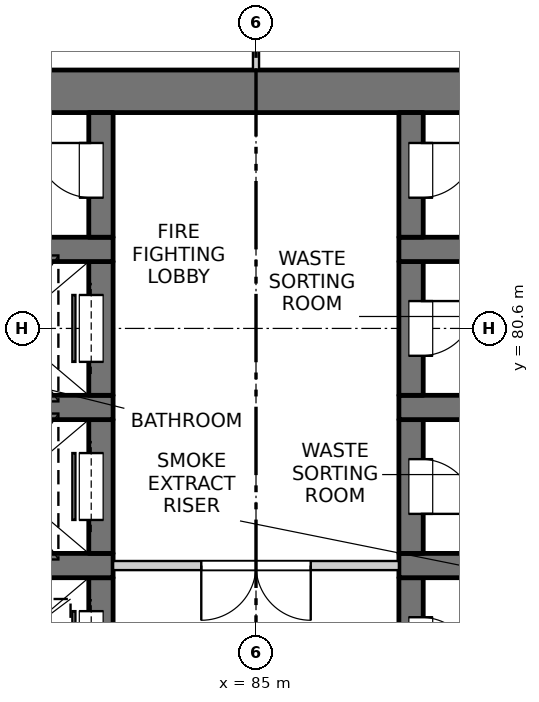
"""IFC4 building model, lengths in metres.
Left out: names, types, materials, properties, quantities, classifications, styles, units other than length and angle.
Written with IfcOpenShell. Run it as: python <this file> out.ifc"""

import sys

from ifc_helpers import new_model, si_unit, direction, frame, frame_2d, origin, place, context, subcontext, project, spatial, rectangle, extrude, element, fill, save


model = new_model("IFC4")
c1 = context("Model", 3, precision=1e-05, world=origin(), true_north=direction((0.0, 1.0)))
c2 = subcontext(c1, "Body", "Model", "MODEL_VIEW")
j1 = project(units=[si_unit("LENGTHUNIT", "METRE"), si_unit("PLANEANGLEUNIT", "RADIAN")], contexts=[c1])
p1 = place(None, origin())
s1 = spatial("IfcSite", under=j1, at=p1, CompositionType="ELEMENT")
p2 = place(p1, origin())
s2 = spatial("IfcBuilding", under=s1, at=p2, CompositionType="ELEMENT")
p3 = place(p2, frame((0.0, 0.0, 29.7)))
s3 = spatial("IfcBuildingStorey", under=s2, at=p3, CompositionType="ELEMENT", Elevation=29.7)
p4 = place(p3, frame((75.6, 84.5, -0.25), z_axis=(0.0, 0.0, 1.0), x_axis=(1.0, 0.0, 0.0)))
e1 = element("IfcWall", 1, at=p4, inside=s3, PredefinedType="SOLIDWALL", context=c2, shape_type="SweptSolid", body=[
    extrude(rectangle(XDim=18.8, YDim=0.7, at=frame_2d((9.4, 0.0))), origin(), (0.0, 0.0, 1.0), 3.4),
])
p5 = place(p3, frame((82.45, 74.3, -0.25), z_axis=(0.0, 0.0, 1.0), x_axis=(0.0, 1.0, 0.0)))
e2 = element("IfcWall", 2, at=p5, inside=s3, PredefinedType="SOLIDWALL", context=c2, shape_type="SweptSolid", body=[
    extrude(rectangle(XDim=2.2, YDim=0.4, at=frame_2d((1.1, 0.0))), origin(), (0.0, 0.0, 1.0), 3.4),
])
p6 = place(p5, frame((0.55, 0.0, 0.25)))
e3 = element("IfcOpeningElement", 3, at=p6, cuts=e2, PredefinedType="OPENING", context=c2, shape_type="SweptSolid", body=[
    extrude(rectangle(XDim=1.1, YDim=2.1, at=frame_2d((0.55, 1.05))), frame((0.0, 0.21, 0.0), z_axis=(0.0, -1.0, 0.0), x_axis=(1.0, 0.0, 0.0)), (0.0, 0.0, 1.0), 0.42),
])
p7 = place(p3, frame((79.65, 76.7, -0.25), z_axis=(0.0, 0.0, 1.0), x_axis=(1.0, 0.0, 0.0)))
e4 = element("IfcWall", 4, at=p7, inside=s3, PredefinedType="SOLIDWALL", context=c2, shape_type="SweptSolid", body=[
    extrude(rectangle(XDim=3.0, YDim=0.4, at=frame_2d((1.5, 0.0))), origin(), (0.0, 0.0, 1.0), 3.4),
])
p8 = place(p3, frame((82.45, 76.9, -0.25), z_axis=(0.0, 0.0, 1.0), x_axis=(0.0, 1.0, 0.0)))
e5 = element("IfcWall", 5, at=p8, inside=s3, PredefinedType="SOLIDWALL", context=c2, shape_type="SweptSolid", body=[
    extrude(rectangle(XDim=2.2, YDim=0.4, at=frame_2d((1.1, 0.0))), origin(), (0.0, 0.0, 1.0), 3.4),
])
p9 = place(p8, frame((0.55, 0.0, 0.25)))
e6 = element("IfcOpeningElement", 6, at=p9, cuts=e5, PredefinedType="OPENING", context=c2, shape_type="SweptSolid", body=[
    extrude(rectangle(XDim=1.1, YDim=2.1, at=frame_2d((0.55, 1.05))), frame((0.0, 0.21, 0.0), z_axis=(0.0, -1.0, 0.0), x_axis=(1.0, 0.0, 0.0)), (0.0, 0.0, 1.0), 0.42),
])
p10 = place(p3, frame((79.65, 79.3, -0.25), z_axis=(0.0, 0.0, 1.0), x_axis=(1.0, 0.0, 0.0)))
e7 = element("IfcWall", 7, at=p10, inside=s3, PredefinedType="SOLIDWALL", context=c2, shape_type="SweptSolid", body=[
    extrude(rectangle(XDim=3.0, YDim=0.4, at=frame_2d((1.5, 0.0))), origin(), (0.0, 0.0, 1.0), 3.4),
])
p11 = place(p3, frame((82.45, 79.5, -0.25), z_axis=(0.0, 0.0, 1.0), x_axis=(0.0, 1.0, 0.0)))
e8 = element("IfcWall", 8, at=p11, inside=s3, PredefinedType="SOLIDWALL", context=c2, shape_type="SweptSolid", body=[
    extrude(rectangle(XDim=2.2, YDim=0.4, at=frame_2d((1.1, 0.0))), origin(), (0.0, 0.0, 1.0), 3.4),
])
p12 = place(p11, frame((0.55, 0.0, 0.25)))
e9 = element("IfcOpeningElement", 9, at=p12, cuts=e8, PredefinedType="OPENING", context=c2, shape_type="SweptSolid", body=[
    extrude(rectangle(XDim=1.1, YDim=2.1, at=frame_2d((0.55, 1.05))), frame((0.0, 0.21, 0.0), z_axis=(0.0, -1.0, 0.0), x_axis=(1.0, 0.0, 0.0)), (0.0, 0.0, 1.0), 0.42),
])
p13 = place(p3, frame((79.65, 81.9, -0.25), z_axis=(0.0, 0.0, 1.0), x_axis=(1.0, 0.0, 0.0)))
e10 = element("IfcWall", 10, at=p13, inside=s3, PredefinedType="SOLIDWALL", context=c2, shape_type="SweptSolid", body=[
    extrude(rectangle(XDim=3.0, YDim=0.4, at=frame_2d((1.5, 0.0))), origin(), (0.0, 0.0, 1.0), 3.4),
])
p14 = place(p3, frame((82.45, 82.1, -0.25), z_axis=(0.0, 0.0, 1.0), x_axis=(0.0, 1.0, 0.0)))
e11 = element("IfcWall", 11, at=p14, inside=s3, PredefinedType="SOLIDWALL", context=c2, shape_type="SweptSolid", body=[
    extrude(rectangle(XDim=2.05, YDim=0.4, at=frame_2d((1.025, 0.0))), origin(), (0.0, 0.0, 1.0), 3.4),
])
p15 = place(p14, frame((0.65, 0.0, 0.25)))
e12 = element("IfcOpeningElement", 12, at=p15, cuts=e11, PredefinedType="OPENING", context=c2, shape_type="SweptSolid", body=[
    extrude(rectangle(XDim=0.9, YDim=2.1, at=frame_2d((0.45, 1.05))), frame((0.0, 0.21, 0.0), z_axis=(0.0, -1.0, 0.0), x_axis=(1.0, 0.0, 0.0)), (0.0, 0.0, 1.0), 0.42),
])
p16 = place(p3, frame((87.55, 74.3, -0.25), z_axis=(0.0, 0.0, 1.0), x_axis=(0.0, 1.0, 0.0)))
e13 = element("IfcWall", 13, at=p16, inside=s3, PredefinedType="SOLIDWALL", context=c2, shape_type="SweptSolid", body=[
    extrude(rectangle(XDim=2.2, YDim=0.4, at=frame_2d((1.1, 0.0))), origin(), (0.0, 0.0, 1.0), 3.4),
])
p17 = place(p16, frame((0.65, 0.0, 0.25)))
e14 = element("IfcOpeningElement", 14, at=p17, cuts=e13, PredefinedType="OPENING", context=c2, shape_type="SweptSolid", body=[
    extrude(rectangle(XDim=0.9, YDim=2.1, at=frame_2d((0.45, 1.05))), frame((0.0, 0.21, 0.0), z_axis=(0.0, -1.0, 0.0), x_axis=(1.0, 0.0, 0.0)), (0.0, 0.0, 1.0), 0.42),
])
p18 = place(p3, frame((87.35, 76.7, -0.25), z_axis=(0.0, 0.0, 1.0), x_axis=(1.0, 0.0, 0.0)))
e15 = element("IfcWall", 15, at=p18, inside=s3, PredefinedType="SOLIDWALL", context=c2, shape_type="SweptSolid", body=[
    extrude(rectangle(XDim=3.0, YDim=0.4, at=frame_2d((1.5, 0.0))), origin(), (0.0, 0.0, 1.0), 3.4),
])
p19 = place(p3, frame((87.55, 76.9, -0.25), z_axis=(0.0, 0.0, 1.0), x_axis=(0.0, 1.0, 0.0)))
e16 = element("IfcWall", 16, at=p19, inside=s3, PredefinedType="SOLIDWALL", context=c2, shape_type="SweptSolid", body=[
    extrude(rectangle(XDim=2.2, YDim=0.4, at=frame_2d((1.1, 0.0))), origin(), (0.0, 0.0, 1.0), 3.4),
])
p20 = place(p19, frame((0.65, 0.0, 0.25)))
e17 = element("IfcOpeningElement", 17, at=p20, cuts=e16, PredefinedType="OPENING", context=c2, shape_type="SweptSolid", body=[
    extrude(rectangle(XDim=0.9, YDim=2.1, at=frame_2d((0.45, 1.05))), frame((0.0, 0.21, 0.0), z_axis=(0.0, -1.0, 0.0), x_axis=(1.0, 0.0, 0.0)), (0.0, 0.0, 1.0), 0.42),
])
p21 = place(p3, frame((87.35, 79.3, -0.25), z_axis=(0.0, 0.0, 1.0), x_axis=(1.0, 0.0, 0.0)))
e18 = element("IfcWall", 18, at=p21, inside=s3, PredefinedType="SOLIDWALL", context=c2, shape_type="SweptSolid", body=[
    extrude(rectangle(XDim=3.0, YDim=0.4, at=frame_2d((1.5, 0.0))), origin(), (0.0, 0.0, 1.0), 3.4),
])
p22 = place(p3, frame((87.55, 79.5, -0.25), z_axis=(0.0, 0.0, 1.0), x_axis=(0.0, 1.0, 0.0)))
e19 = element("IfcWall", 19, at=p22, inside=s3, PredefinedType="SOLIDWALL", context=c2, shape_type="SweptSolid", body=[
    extrude(rectangle(XDim=2.2, YDim=0.4, at=frame_2d((1.1, 0.0))), origin(), (0.0, 0.0, 1.0), 3.4),
])
p23 = place(p22, frame((0.65, 0.0, 0.25)))
e20 = element("IfcOpeningElement", 20, at=p23, cuts=e19, PredefinedType="OPENING", context=c2, shape_type="SweptSolid", body=[
    extrude(rectangle(XDim=0.9, YDim=2.1, at=frame_2d((0.45, 1.05))), frame((0.0, 0.21, 0.0), z_axis=(0.0, -1.0, 0.0), x_axis=(1.0, 0.0, 0.0)), (0.0, 0.0, 1.0), 0.42),
])
p24 = place(p3, frame((87.35, 81.9, -0.25), z_axis=(0.0, 0.0, 1.0), x_axis=(1.0, 0.0, 0.0)))
e21 = element("IfcWall", 21, at=p24, inside=s3, PredefinedType="SOLIDWALL", context=c2, shape_type="SweptSolid", body=[
    extrude(rectangle(XDim=3.0, YDim=0.4, at=frame_2d((1.5, 0.0))), origin(), (0.0, 0.0, 1.0), 3.4),
])
p25 = place(p3, frame((87.55, 82.1, -0.25), z_axis=(0.0, 0.0, 1.0), x_axis=(0.0, 1.0, 0.0)))
e22 = element("IfcWall", 22, at=p25, inside=s3, PredefinedType="SOLIDWALL", context=c2, shape_type="SweptSolid", body=[
    extrude(rectangle(XDim=2.05, YDim=0.4, at=frame_2d((1.025, 0.0))), origin(), (0.0, 0.0, 1.0), 3.4),
])
p26 = place(p25, frame((0.65, 0.0, 0.25)))
e23 = element("IfcOpeningElement", 23, at=p26, cuts=e22, PredefinedType="OPENING", context=c2, shape_type="SweptSolid", body=[
    extrude(rectangle(XDim=0.9, YDim=2.1, at=frame_2d((0.45, 1.05))), frame((0.0, 0.21, 0.0), z_axis=(0.0, -1.0, 0.0), x_axis=(1.0, 0.0, 0.0)), (0.0, 0.0, 1.0), 0.42),
])
p27 = place(p3, frame((82.65, 76.7, 0.0), z_axis=(0.0, 0.0, 1.0), x_axis=(1.0, 0.0, 0.0)))
e24 = element("IfcWall", 24, at=p27, inside=s3, PredefinedType="PARTITIONING", context=c2, shape_type="SweptSolid", body=[
    extrude(rectangle(XDim=4.7, YDim=0.15, at=frame_2d((2.35, 0.0))), origin(), (0.0, 0.0, 1.0), 3.15),
])
p28 = place(p27, frame((1.45, 0.0, 0.0)))
e25 = element("IfcOpeningElement", 25, at=p28, cuts=e24, PredefinedType="OPENING", context=c2, shape_type="SweptSolid", body=[
    extrude(rectangle(XDim=1.8, YDim=2.1, at=frame_2d((0.9, 1.05))), frame((0.0, 0.085, 0.0), z_axis=(0.0, -1.0, 0.0), x_axis=(1.0, 0.0, 0.0)), (0.0, 0.0, 1.0), 0.17),
])
p29 = place(p3, frame((85.0, 84.85, 0.0), z_axis=(0.0, 0.0, 1.0), x_axis=(0.0, 1.0, 0.0)))
e26 = element("IfcWall", 26, at=p29, inside=s3, PredefinedType="PARTITIONING", context=c2, shape_type="SweptSolid", body=[
    extrude(rectangle(XDim=3.25, YDim=0.1, at=frame_2d((1.625, 0.0))), origin(), (0.0, 0.0, 1.0), 3.15),
])
p30 = place(p29, frame((1.15, 0.0, 0.0)))
e27 = element("IfcOpeningElement", 27, at=p30, cuts=e26, PredefinedType="OPENING", context=c2, shape_type="SweptSolid", body=[
    extrude(rectangle(XDim=0.9, YDim=2.1, at=frame_2d((0.45, 1.05))), frame((0.0, 0.06, 0.0), z_axis=(0.0, -1.0, 0.0), x_axis=(1.0, 0.0, 0.0)), (0.0, 0.0, 1.0), 0.12),
])
p31 = place(p6, origin())
e28 = element("IfcDoor", 28, at=p31, inside=s3, OperationType="SLIDING_TO_LEFT", PredefinedType="DOOR", context=c2, shape_type="SweptSolid", body=[
    extrude(rectangle(XDim=1.1, YDim=2.1, at=frame_2d((0.55, 1.05))), frame((0.0, 0.185, 0.0), z_axis=(0.0, -1.0, 0.0), x_axis=(1.0, 0.0, 0.0)), (0.0, 0.0, 1.0), 0.05),
])
fill(e3, e28)
p32 = place(p17, origin())
e29 = element("IfcDoor", 29, at=p32, inside=s3, OperationType="SINGLE_SWING_RIGHT", PredefinedType="DOOR", context=c2, shape_type="SweptSolid", body=[
    extrude(rectangle(XDim=0.9, YDim=2.1, at=frame_2d((0.45, 1.05))), frame((0.0, -0.135, 0.0), z_axis=(0.0, -1.0, 0.0), x_axis=(1.0, 0.0, 0.0)), (0.0, 0.0, 1.0), 0.05),
])
fill(e14, e29)
p33 = place(p28, origin())
e30 = element("IfcDoor", 30, at=p33, inside=s3, OperationType="DOUBLE_DOOR_SINGLE_SWING", PredefinedType="DOOR", context=c2, shape_type="SweptSolid", body=[
    extrude(rectangle(XDim=1.8, YDim=2.1, at=frame_2d((0.9, 1.05))), frame((0.0, 0.025, 0.0), z_axis=(0.0, -1.0, 0.0), x_axis=(1.0, 0.0, 0.0)), (0.0, 0.0, 1.0), 0.05),
])
fill(e25, e30)
p34 = place(p9, origin())
e31 = element("IfcDoor", 31, at=p34, inside=s3, OperationType="SLIDING_TO_LEFT", PredefinedType="DOOR", context=c2, shape_type="SweptSolid", body=[
    extrude(rectangle(XDim=1.1, YDim=2.1, at=frame_2d((0.55, 1.05))), frame((0.0, 0.185, 0.0), z_axis=(0.0, -1.0, 0.0), x_axis=(1.0, 0.0, 0.0)), (0.0, 0.0, 1.0), 0.05),
])
fill(e6, e31)
p35 = place(p20, origin())
e32 = element("IfcDoor", 32, at=p35, inside=s3, OperationType="SINGLE_SWING_RIGHT", PredefinedType="DOOR", context=c2, shape_type="SweptSolid", body=[
    extrude(rectangle(XDim=0.9, YDim=2.1, at=frame_2d((0.45, 1.05))), frame((0.0, -0.135, 0.0), z_axis=(0.0, -1.0, 0.0), x_axis=(1.0, 0.0, 0.0)), (0.0, 0.0, 1.0), 0.05),
])
fill(e17, e32)
p36 = place(p12, origin())
e33 = element("IfcDoor", 33, at=p36, inside=s3, OperationType="SLIDING_TO_LEFT", PredefinedType="DOOR", context=c2, shape_type="SweptSolid", body=[
    extrude(rectangle(XDim=1.1, YDim=2.1, at=frame_2d((0.55, 1.05))), frame((0.0, 0.185, 0.0), z_axis=(0.0, -1.0, 0.0), x_axis=(1.0, 0.0, 0.0)), (0.0, 0.0, 1.0), 0.05),
])
fill(e9, e33)
p37 = place(p23, origin())
e34 = element("IfcDoor", 34, at=p37, inside=s3, OperationType="SINGLE_SWING_LEFT", PredefinedType="DOOR", context=c2, shape_type="SweptSolid", body=[
    extrude(rectangle(XDim=0.9, YDim=2.1, at=frame_2d((0.45, 1.05))), frame((0.0, -0.135, 0.0), z_axis=(0.0, -1.0, 0.0), x_axis=(1.0, 0.0, 0.0)), (0.0, 0.0, 1.0), 0.05),
])
fill(e20, e34)
p38 = place(p15, origin())
e35 = element("IfcDoor", 35, at=p38, inside=s3, OperationType="SINGLE_SWING_RIGHT", PredefinedType="DOOR", context=c2, shape_type="SweptSolid", body=[
    extrude(rectangle(XDim=0.9, YDim=2.1, at=frame_2d((0.45, 1.05))), frame((0.0, 0.185, 0.0), z_axis=(0.0, -1.0, 0.0), x_axis=(1.0, 0.0, 0.0)), (0.0, 0.0, 1.0), 0.05),
])
fill(e12, e35)
p39 = place(p26, origin())
e36 = element("IfcDoor", 36, at=p39, inside=s3, OperationType="SINGLE_SWING_LEFT", PredefinedType="DOOR", context=c2, shape_type="SweptSolid", body=[
    extrude(rectangle(XDim=0.9, YDim=2.1, at=frame_2d((0.45, 1.05))), frame((0.0, -0.135, 0.0), z_axis=(0.0, -1.0, 0.0), x_axis=(1.0, 0.0, 0.0)), (0.0, 0.0, 1.0), 0.05),
])
fill(e23, e36)
save(model, sys.argv[1])
